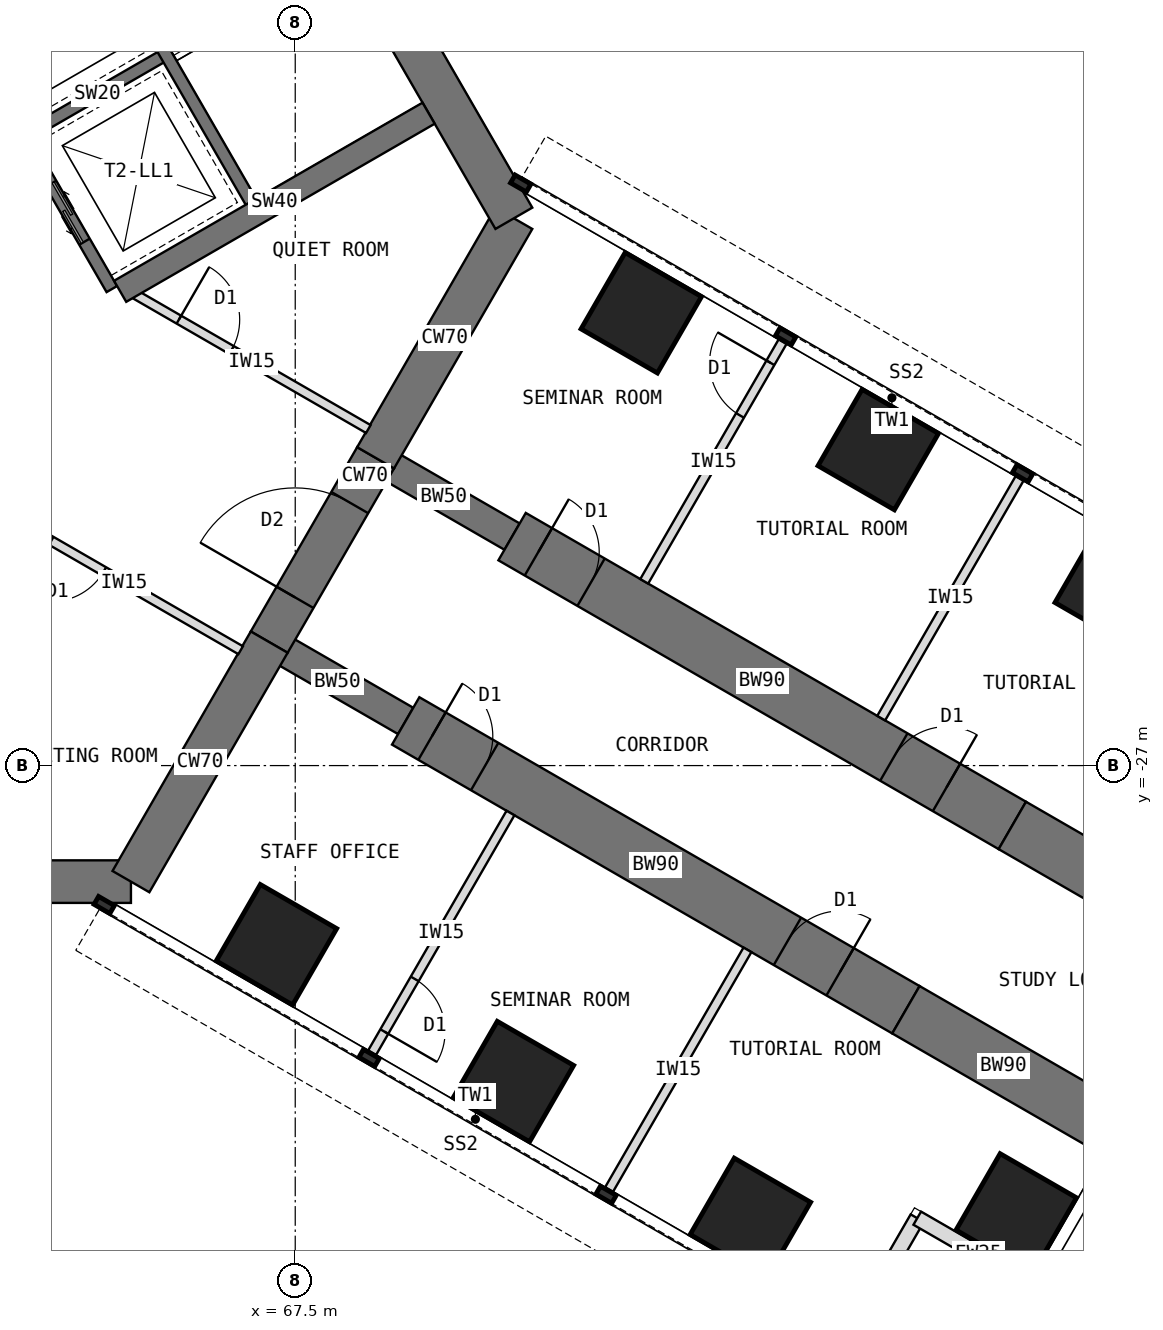
"""IFC4 building model, lengths in metres.
Left out: names, types, materials, properties, quantities, classifications, styles, units other than length and angle.
Written with IfcOpenShell. Run it as: python <this file> out.ifc"""

import sys

from ifc_helpers import new_model, si_unit, direction, frame, frame_2d, origin, origin_2d, place, context, subcontext, project, spatial, rectangle, extrude, element, fill, save


model = new_model("IFC4")
c1 = context("Model", 3, precision=1e-05, world=origin(), true_north=direction((0.0, 1.0)))
c2 = subcontext(c1, "Body", "Model", "MODEL_VIEW")
j1 = project(units=[si_unit("LENGTHUNIT", "METRE"), si_unit("PLANEANGLEUNIT", "RADIAN")], contexts=[c1])
p1 = place(None, origin())
s1 = spatial("IfcSite", under=j1, at=p1, CompositionType="ELEMENT")
p2 = place(p1, origin())
s2 = spatial("IfcBuilding", under=s1, at=p2, CompositionType="ELEMENT")
p3 = place(p2, frame((0.0, 0.0, 64.5)))
s3 = spatial("IfcBuildingStorey", under=s2, at=p3, CompositionType="ELEMENT", Elevation=64.5)
p4 = place(p3, frame((52.202, -28.908, 0.0), z_axis=(0.0, 0.0, 1.0), x_axis=(1.0, 0.0, 0.0)))
e1 = element("IfcWall", 1, at=p4, inside=s3, PredefinedType="SHEAR", context=c2, shape_type="SweptSolid", body=[
    extrude(rectangle(XDim=12.596, YDim=0.7, at=frame_2d((6.298, 0.0))), origin(), (0.0, 0.0, 1.0), 4.0),
])
p5 = place(p3, frame((64.798, -28.908, 0.0), z_axis=(0.0, 0.0, 1.0), x_axis=(0.499984222037, 0.866034513004, 0.0)))
e2 = element("IfcWall", 2, at=p5, inside=s3, PredefinedType="SHEAR", context=c2, shape_type="SweptSolid", body=[
    extrude(rectangle(XDim=4.548, YDim=0.7, at=frame_2d((2.274, 0.0))), origin(), (0.0, 0.0, 1.0), 4.0),
])
p6 = place(p3, frame((67.072, -24.97, 0.0), z_axis=(0.0, 0.0, 1.0), x_axis=(0.500010275428, 0.866019471182, 0.0)))
e3 = element("IfcWall", 3, at=p6, inside=s3, PredefinedType="SHEAR", context=c2, shape_type="SweptSolid", body=[
    extrude(rectangle(XDim=3.5, YDim=0.7, at=frame_2d((1.75, 0.0))), origin(), (0.0, 0.0, 1.0), 4.0),
])
p7 = place(p6, frame((0.85, 0.0, 0.0)))
e4 = element("IfcOpeningElement", 4, at=p7, cuts=e3, PredefinedType="OPENING", context=c2, shape_type="SweptSolid", body=[
    extrude(rectangle(XDim=1.8, YDim=2.1, at=frame_2d((0.9, 1.05))), frame((0.0, 0.36, 0.0), z_axis=(0.0, -1.0, 0.0), x_axis=(1.0, 0.0, 0.0)), (0.0, 0.0, 1.0), 0.72),
])
p8 = place(p3, frame((68.822, -21.939, 0.0), z_axis=(0.0, 0.0, 1.0), x_axis=(0.500024481964, 0.866011268655, 0.0)))
e5 = element("IfcWall", 5, at=p8, inside=s3, PredefinedType="SHEAR", context=c2, shape_type="SweptSolid", body=[
    extrude(rectangle(XDim=4.548, YDim=0.7, at=frame_2d((2.274, 0.0))), origin(), (0.0, 0.0, 1.0), 4.0),
])
p9 = place(p3, frame((71.096, -18.0, 0.0), z_axis=(0.0, 0.0, 1.0), x_axis=(-0.500005998175, 0.866021940709, 0.0)))
e6 = element("IfcWall", 6, at=p9, inside=s3, PredefinedType="SHEAR", context=c2, shape_type="SweptSolid", body=[
    extrude(rectangle(XDim=12.596, YDim=0.7, at=frame_2d((6.298, 0.0))), origin(), (0.0, 0.0, 1.0), 4.0),
])
p10 = place(p3, frame((68.822, -21.939, 0.0), z_axis=(0.0, 0.0, 1.0), x_axis=(0.866072649678, -0.499918158782, 0.0)))
e7 = element("IfcWall", 7, at=p10, inside=s3, PredefinedType="SHEAR", context=c2, shape_type="SweptSolid", body=[
    extrude(rectangle(XDim=2.592, YDim=0.5, at=frame_2d((1.296, 0.0))), origin(), (0.0, 0.0, 1.0), 4.0),
])
p11 = place(p3, frame((71.066, -23.234, 0.0), z_axis=(0.0, 0.0, 1.0), x_axis=(0.86602681393, -0.499997557548, 0.0)))
e8 = element("IfcWall", 8, at=p11, inside=s3, PredefinedType="SHEAR", context=c2, shape_type="SweptSolid", body=[
    extrude(rectangle(XDim=9.5, YDim=0.9, at=frame_2d((4.75, 0.0))), origin(), (0.0, 0.0, 1.0), 4.0),
])
p12 = place(p11, frame((0.5, 0.0, 0.0)))
e9 = element("IfcOpeningElement", 9, at=p12, cuts=e8, PredefinedType="OPENING", context=c2, shape_type="SweptSolid", body=[
    extrude(rectangle(XDim=1.0, YDim=2.1, at=frame_2d((0.5, 1.05))), frame((0.0, 0.46, 0.0), z_axis=(0.0, -1.0, 0.0), x_axis=(1.0, 0.0, 0.0)), (0.0, 0.0, 1.0), 0.92),
])
p13 = place(p11, frame((7.25, 0.0, 0.0)))
e10 = element("IfcOpeningElement", 10, at=p13, cuts=e8, PredefinedType="OPENING", context=c2, shape_type="SweptSolid", body=[
    extrude(rectangle(XDim=1.0, YDim=2.1, at=frame_2d((0.5, 1.05))), frame((0.0, 0.46, 0.0), z_axis=(0.0, -1.0, 0.0), x_axis=(1.0, 0.0, 0.0)), (0.0, 0.0, 1.0), 0.92),
])
p14 = place(p3, frame((79.294, -27.984, 0.0), z_axis=(0.0, 0.0, 1.0), x_axis=(0.866000971088, -0.500042316284, 0.0)))
e11 = element("IfcWall", 11, at=p14, inside=s3, PredefinedType="SHEAR", context=c2, shape_type="SweptSolid", body=[
    extrude(rectangle(XDim=3.7, YDim=0.9, at=frame_2d((1.85, 0.0))), origin(), (0.0, 0.0, 1.0), 4.0),
])
p15 = place(p3, frame((67.072, -24.97, 0.0), z_axis=(0.0, 0.0, 1.0), x_axis=(0.866031863473, -0.499988811324, 0.0)))
e12 = element("IfcWall", 12, at=p15, inside=s3, PredefinedType="SHEAR", context=c2, shape_type="SweptSolid", body=[
    extrude(rectangle(XDim=2.592, YDim=0.5, at=frame_2d((1.296, 0.0))), origin(), (0.0, 0.0, 1.0), 4.0),
])
p16 = place(p3, frame((69.316, -26.266, 0.0), z_axis=(0.0, 0.0, 1.0), x_axis=(0.86602681393, -0.499997557548, 0.0)))
e13 = element("IfcWall", 13, at=p16, inside=s3, PredefinedType="SHEAR", context=c2, shape_type="SweptSolid", body=[
    extrude(rectangle(XDim=9.5, YDim=0.9, at=frame_2d((4.75, 0.0))), origin(), (0.0, 0.0, 1.0), 4.0),
])
p17 = place(p16, frame((0.5, 0.0, 0.0)))
e14 = element("IfcOpeningElement", 14, at=p17, cuts=e13, PredefinedType="OPENING", context=c2, shape_type="SweptSolid", body=[
    extrude(rectangle(XDim=1.0, YDim=2.1, at=frame_2d((0.5, 1.05))), frame((0.0, 0.46, 0.0), z_axis=(0.0, -1.0, 0.0), x_axis=(1.0, 0.0, 0.0)), (0.0, 0.0, 1.0), 0.92),
])
p18 = place(p16, frame((7.25, 0.0, 0.0)))
e15 = element("IfcOpeningElement", 15, at=p18, cuts=e13, PredefinedType="OPENING", context=c2, shape_type="SweptSolid", body=[
    extrude(rectangle(XDim=1.0, YDim=2.1, at=frame_2d((0.5, 1.05))), frame((0.0, 0.46, 0.0), z_axis=(0.0, -1.0, 0.0), x_axis=(1.0, 0.0, 0.0)), (0.0, 0.0, 1.0), 0.92),
])
p19 = place(p3, frame((77.544, -31.016, 0.0), z_axis=(0.0, 0.0, 1.0), x_axis=(0.866029545028, -0.499992827086, 0.0)))
e16 = element("IfcWall", 16, at=p19, inside=s3, PredefinedType="SHEAR", context=c2, shape_type="SweptSolid", body=[
    extrude(rectangle(XDim=3.7, YDim=0.9, at=frame_2d((1.85, 0.0))), origin(), (0.0, 0.0, 1.0), 4.0),
])
for number, where, z_axis, x_axis in (
    (17, (73.191, -19.554, 0.0), (0.0, 0.0, 1.0), (0.5, 0.866, 0.0)),
    (18, (67.191, -29.946, 0.0), (0.0, 0.0, 1.0), (0.5, 0.866, 0.0)),
    (19, (77.088, -21.804, 0.0), (0.0, 0.0, 1.0), (0.5, 0.866, 0.0)),
    (20, (71.088, -32.196, 0.0), (0.0, 0.0, 1.0), (0.5, 0.866, 0.0)),
    (21, (80.986, -24.054, 0.0), (0.0, 0.0, 1.0), (0.5, 0.866, 0.0)),
    (22, (74.986, -34.446, 0.0), (0.0, 0.0, 1.0), (0.5, 0.866, 0.0)),
    (23, (79.358, -34.373, 0.0), (0.0, 0.0, 1.0), (0.5, 0.866, 0.0)),
):
    element("IfcColumn", number, at=place(p3, frame(where, z_axis=z_axis, x_axis=x_axis)), inside=s3, PredefinedType="COLUMN", context=c2, shape_type="SweptSolid", body=[
        extrude(rectangle(XDim=1.45, YDim=1.45, at=origin_2d()), origin(), (0.0, 0.0, 1.0), 4.0),
    ])
for number, where, z_axis, x_axis in (
    (24, (76.567, -36.456, 0.0), (0.0, 0.0, 1.0), (0.5, 0.866, 0.0)),
    (25, (77.73, -34.443, 0.0), (0.0, 0.0, 1.0), (0.866, -0.5, 0.0)),
):
    element("IfcWall", number, at=place(p3, frame(where, z_axis=z_axis, x_axis=x_axis)), inside=s3, PredefinedType="STANDARD", context=c2, shape_type="SweptSolid", body=[
        extrude(rectangle(XDim=2.325, YDim=0.25, at=frame_2d((1.163, 0.0))), origin(), (0.0, 0.0, 1.0), 3.8),
    ])
p20 = place(p3, frame((64.484, -19.164, 0.0), z_axis=(0.0, 0.0, 1.0), x_axis=(-0.49999894854, 0.866026010844, 0.0)))
e26 = element("IfcWall", 26, at=p20, inside=s3, PredefinedType="SHEAR", context=c2, shape_type="SweptSolid", body=[
    extrude(rectangle(XDim=8.0, YDim=0.2, at=frame_2d((4.0, 0.0))), origin(), (0.0, 0.0, 1.0), 4.0),
])
p21 = place(p20, frame((6.3, 0.0, 0.0)))
e27 = element("IfcOpeningElement", 27, at=p21, cuts=e26, PredefinedType="OPENING", context=c2, shape_type="SweptSolid", body=[
    extrude(rectangle(XDim=1.2, YDim=2.1, at=frame_2d((0.6, 1.05))), frame((0.0, 0.11, 0.0), z_axis=(0.0, -1.0, 0.0), x_axis=(1.0, 0.0, 0.0)), (0.0, 0.0, 1.0), 0.22),
])
p22 = place(p20, frame((0.9, 0.0, 0.0)))
e28 = element("IfcOpeningElement", 28, at=p22, cuts=e26, PredefinedType="OPENING", context=c2, shape_type="SweptSolid", body=[
    extrude(rectangle(XDim=1.1, YDim=2.2, at=frame_2d((0.55, 1.1))), frame((0.0, 0.11, 0.0), z_axis=(0.0, -1.0, 0.0), x_axis=(1.0, 0.0, 0.0)), (0.0, 0.0, 1.0), 0.22),
])
p23 = place(p20, frame((3.8, 0.0, 0.0)))
e29 = element("IfcOpeningElement", 29, at=p23, cuts=e26, PredefinedType="OPENING", context=c2, shape_type="SweptSolid", body=[
    extrude(rectangle(XDim=1.1, YDim=2.2, at=frame_2d((0.55, 1.1))), frame((0.0, 0.11, 0.0), z_axis=(0.0, -1.0, 0.0), x_axis=(1.0, 0.0, 0.0)), (0.0, 0.0, 1.0), 0.22),
])
p24 = place(p3, frame((63.12, -16.603, 0.0), z_axis=(0.0, 0.0, 1.0), x_axis=(0.866062058628, 0.499936506574, 0.0)))
e30 = element("IfcWall", 30, at=p24, inside=s3, PredefinedType="SHEAR", context=c2, shape_type="SweptSolid", body=[
    extrude(rectangle(XDim=2.6, YDim=0.2, at=frame_2d((1.3, 0.0))), origin(), (0.0, 0.0, 1.0), 4.0),
])
p25 = place(p3, frame((66.822, -17.814, 0.0), z_axis=(0.0, 0.0, 1.0), x_axis=(-0.49999894854, 0.866026010844, 0.0)))
e31 = element("IfcWall", 31, at=p25, inside=s3, PredefinedType="SHEAR", context=c2, shape_type="SweptSolid", body=[
    extrude(rectangle(XDim=8.0, YDim=0.2, at=frame_2d((4.0, 0.0))), origin(), (0.0, 0.0, 1.0), 4.0),
])
p26 = place(p25, frame((6.7, 0.0, 0.0)))
e32 = element("IfcOpeningElement", 32, at=p26, cuts=e31, PredefinedType="OPENING", context=c2, shape_type="SweptSolid", body=[
    extrude(rectangle(XDim=1.1, YDim=2.1, at=frame_2d((0.55, 1.05))), frame((0.0, 0.11, 0.0), z_axis=(0.0, -1.0, 0.0), x_axis=(1.0, 0.0, 0.0)), (0.0, 0.0, 1.0), 0.22),
])
p27 = place(p3, frame((64.62, -19.201, 0.0), z_axis=(0.0, 0.0, 1.0), x_axis=(0.866023886965, 0.500002627198, 0.0)))
e33 = element("IfcWall", 33, at=p27, inside=s3, PredefinedType="SHEAR", context=c2, shape_type="SweptSolid", body=[
    extrude(rectangle(XDim=5.858, YDim=0.4, at=frame_2d((2.929, 0.0))), origin(), (0.0, 0.0, 1.0), 4.0),
])
p28 = place(p3, frame((73.24, -23.97, 0.0), z_axis=(0.0, 0.0, 1.0), x_axis=(0.499982560684, 0.866035472144, 0.0)))
e34 = element("IfcWall", 34, at=p28, inside=s3, PredefinedType="PARTITIONING", context=c2, shape_type="SweptSolid", body=[
    extrude(rectangle(XDim=4.55, YDim=0.15, at=frame_2d((2.275, 0.0))), origin(), (0.0, 0.0, 1.0), 3.8),
])
p29 = place(p28, frame((3.15, 0.0, 0.0)))
e35 = element("IfcOpeningElement", 35, at=p29, cuts=e34, PredefinedType="OPENING", context=c2, shape_type="SweptSolid", body=[
    extrude(rectangle(XDim=1.0, YDim=2.1, at=frame_2d((0.5, 1.05))), frame((0.0, 0.085, 0.0), z_axis=(0.0, -1.0, 0.0), x_axis=(1.0, 0.0, 0.0)), (0.0, 0.0, 1.0), 0.17),
])
p30 = place(p3, frame((77.137, -26.22, 0.0), z_axis=(0.0, 0.0, 1.0), x_axis=(0.500022803284, 0.866012237902, 0.0)))
e36 = element("IfcWall", 36, at=p30, inside=s3, PredefinedType="PARTITIONING", context=c2, shape_type="SweptSolid", body=[
    extrude(rectangle(XDim=4.55, YDim=0.15, at=frame_2d((2.275, 0.0))), origin(), (0.0, 0.0, 1.0), 3.8),
])
p31 = place(p3, frame((71.04, -27.78, 0.0), z_axis=(0.0, 0.0, 1.0), x_axis=(-0.499982560684, -0.866035472144, 0.0)))
e37 = element("IfcWall", 37, at=p31, inside=s3, PredefinedType="PARTITIONING", context=c2, shape_type="SweptSolid", body=[
    extrude(rectangle(XDim=4.55, YDim=0.15, at=frame_2d((2.275, 0.0))), origin(), (0.0, 0.0, 1.0), 3.8),
])
p32 = place(p31, frame((3.15, 0.0, 0.0)))
e38 = element("IfcOpeningElement", 38, at=p32, cuts=e37, PredefinedType="OPENING", context=c2, shape_type="SweptSolid", body=[
    extrude(rectangle(XDim=1.0, YDim=2.1, at=frame_2d((0.5, 1.05))), frame((0.0, 0.085, 0.0), z_axis=(0.0, -1.0, 0.0), x_axis=(1.0, 0.0, 0.0)), (0.0, 0.0, 1.0), 0.17),
])
p33 = place(p3, frame((74.937, -30.03, 0.0), z_axis=(0.0, 0.0, 1.0), x_axis=(-0.499982560684, -0.866035472144, 0.0)))
e39 = element("IfcWall", 39, at=p33, inside=s3, PredefinedType="PARTITIONING", context=c2, shape_type="SweptSolid", body=[
    extrude(rectangle(XDim=4.55, YDim=0.15, at=frame_2d((2.275, 0.0))), origin(), (0.0, 0.0, 1.0), 3.8),
])
p34 = place(p3, frame((64.87, -19.253, 0.0), z_axis=(0.0, 0.0, 1.0), x_axis=(0.866021148949, -0.500007369519, 0.0)))
e40 = element("IfcWall", 40, at=p34, inside=s3, PredefinedType="PARTITIONING", context=c2, shape_type="SweptSolid", body=[
    extrude(rectangle(XDim=4.426, YDim=0.15, at=frame_2d((2.213, 0.0))), origin(), (0.0, 0.0, 1.0), 3.8),
])
p35 = place(p34, frame((0.828, 0.0, 0.0)))
e41 = element("IfcOpeningElement", 41, at=p35, cuts=e40, PredefinedType="OPENING", context=c2, shape_type="SweptSolid", body=[
    extrude(rectangle(XDim=1.0, YDim=2.1, at=frame_2d((0.5, 1.05))), frame((0.0, 0.085, 0.0), z_axis=(0.0, -1.0, 0.0), x_axis=(1.0, 0.0, 0.0)), (0.0, 0.0, 1.0), 0.17),
])
p36 = place(p3, frame((66.603, -25.103, 0.0), z_axis=(0.0, 0.0, 1.0), x_axis=(-0.866021148949, 0.500007369519, 0.0)))
e42 = element("IfcWall", 42, at=p36, inside=s3, PredefinedType="PARTITIONING", context=c2, shape_type="SweptSolid", body=[
    extrude(rectangle(XDim=4.426, YDim=0.15, at=frame_2d((2.213, 0.0))), origin(), (0.0, 0.0, 1.0), 3.8),
])
p37 = place(p36, frame((2.598, 0.0, 0.0)))
e43 = element("IfcOpeningElement", 43, at=p37, cuts=e42, PredefinedType="OPENING", context=c2, shape_type="SweptSolid", body=[
    extrude(rectangle(XDim=1.0, YDim=2.1, at=frame_2d((0.5, 1.05))), frame((0.0, 0.085, 0.0), z_axis=(0.0, -1.0, 0.0), x_axis=(1.0, 0.0, 0.0)), (0.0, 0.0, 1.0), 0.17),
])
p38 = place(p22, origin())
e44 = element("IfcDoor", 44, at=p38, inside=s3, OperationType="DOUBLE_DOOR_SLIDING", PredefinedType="DOOR", context=c2, shape_type="SweptSolid", body=[
    extrude(rectangle(XDim=1.1, YDim=2.2, at=frame_2d((0.55, 1.1))), frame((0.0, 0.025, 0.0), z_axis=(0.0, -1.0, 0.0), x_axis=(1.0, 0.0, 0.0)), (0.0, 0.0, 1.0), 0.05),
])
fill(e28, e44)
p39 = place(p7, origin())
e45 = element("IfcDoor", 45, at=p39, inside=s3, OperationType="DOUBLE_DOOR_DOUBLE_SWING", PredefinedType="DOOR", context=c2, shape_type="SweptSolid", body=[
    extrude(rectangle(XDim=1.72, YDim=2.06, at=frame_2d((0.9, 1.03))), frame((0.0, 0.025, 0.0), z_axis=(0.0, -1.0, 0.0), x_axis=(1.0, 0.0, 0.0)), (0.0, 0.0, 1.0), 0.05),
    extrude(rectangle(XDim=0.04, YDim=2.1, at=frame_2d((0.02, 1.05))), frame((0.0, 0.35, 0.0), z_axis=(0.0, -1.0, 0.0), x_axis=(1.0, 0.0, 0.0)), (0.0, 0.0, 1.0), 0.699),
    extrude(rectangle(XDim=0.04, YDim=2.1, at=frame_2d((1.78, 1.05))), frame((0.0, 0.35, 0.0), z_axis=(0.0, -1.0, 0.0), x_axis=(1.0, 0.0, 0.0)), (0.0, 0.0, 1.0), 0.699),
    extrude(rectangle(XDim=1.72, YDim=0.04, at=frame_2d((0.9, 2.08))), frame((0.0, 0.35, 0.0), z_axis=(0.0, -1.0, 0.0), x_axis=(1.0, 0.0, 0.0)), (0.0, 0.0, 1.0), 0.699),
])
fill(e4, e45)
p40 = place(p29, origin())
e46 = element("IfcDoor", 46, at=p40, inside=s3, OperationType="SINGLE_SWING_RIGHT", PredefinedType="DOOR", context=c2, shape_type="SweptSolid", body=[
    extrude(rectangle(XDim=1.0, YDim=2.1, at=frame_2d((0.5, 1.05))), frame((0.0, 0.025, 0.0), z_axis=(0.0, -1.0, 0.0), x_axis=(1.0, 0.0, 0.0)), (0.0, 0.0, 1.0), 0.05),
])
fill(e35, e46)
p41 = place(p32, origin())
e47 = element("IfcDoor", 47, at=p41, inside=s3, OperationType="SINGLE_SWING_RIGHT", PredefinedType="DOOR", context=c2, shape_type="SweptSolid", body=[
    extrude(rectangle(XDim=1.0, YDim=2.1, at=frame_2d((0.5, 1.05))), frame((0.0, 0.025, 0.0), z_axis=(0.0, -1.0, 0.0), x_axis=(1.0, 0.0, 0.0)), (0.0, 0.0, 1.0), 0.05),
])
fill(e38, e47)
p42 = place(p37, origin())
e48 = element("IfcDoor", 48, at=p42, inside=s3, OperationType="SINGLE_SWING_RIGHT", PredefinedType="DOOR", context=c2, shape_type="SweptSolid", body=[
    extrude(rectangle(XDim=1.0, YDim=2.1, at=frame_2d((0.5, 1.05))), frame((0.0, 0.025, 0.0), z_axis=(0.0, -1.0, 0.0), x_axis=(1.0, 0.0, 0.0)), (0.0, 0.0, 1.0), 0.05),
])
fill(e43, e48)
p43 = place(p35, origin())
e49 = element("IfcDoor", 49, at=p43, inside=s3, OperationType="SINGLE_SWING_LEFT", PredefinedType="DOOR", context=c2, shape_type="SweptSolid", body=[
    extrude(rectangle(XDim=1.0, YDim=2.1, at=frame_2d((0.5, 1.05))), frame((0.0, 0.025, 0.0), z_axis=(0.0, -1.0, 0.0), x_axis=(1.0, 0.0, 0.0)), (0.0, 0.0, 1.0), 0.05),
])
fill(e41, e49)
p44 = place(p12, origin())
e50 = element("IfcDoor", 50, at=p44, inside=s3, OperationType="SINGLE_SWING_LEFT", PredefinedType="DOOR", context=c2, shape_type="SweptSolid", body=[
    extrude(rectangle(XDim=0.92, YDim=2.06, at=frame_2d((0.5, 1.03))), frame((0.0, 0.025, 0.0), z_axis=(0.0, -1.0, 0.0), x_axis=(1.0, 0.0, 0.0)), (0.0, 0.0, 1.0), 0.05),
    extrude(rectangle(XDim=0.04, YDim=2.1, at=frame_2d((0.02, 1.05))), frame((0.0, 0.45, 0.0), z_axis=(0.0, -1.0, 0.0), x_axis=(1.0, 0.0, 0.0)), (0.0, 0.0, 1.0), 0.899),
    extrude(rectangle(XDim=0.04, YDim=2.1, at=frame_2d((0.98, 1.05))), frame((0.0, 0.45, 0.0), z_axis=(0.0, -1.0, 0.0), x_axis=(1.0, 0.0, 0.0)), (0.0, 0.0, 1.0), 0.899),
    extrude(rectangle(XDim=0.92, YDim=0.04, at=frame_2d((0.5, 2.08))), frame((0.0, 0.45, 0.0), z_axis=(0.0, -1.0, 0.0), x_axis=(1.0, 0.0, 0.0)), (0.0, 0.0, 1.0), 0.899),
])
fill(e9, e50)
p45 = place(p13, origin())
e51 = element("IfcDoor", 51, at=p45, inside=s3, OperationType="SINGLE_SWING_RIGHT", PredefinedType="DOOR", context=c2, shape_type="SweptSolid", body=[
    extrude(rectangle(XDim=0.92, YDim=2.06, at=frame_2d((0.5, 1.03))), frame((0.0, 0.025, 0.0), z_axis=(0.0, -1.0, 0.0), x_axis=(1.0, 0.0, 0.0)), (0.0, 0.0, 1.0), 0.05),
    extrude(rectangle(XDim=0.04, YDim=2.1, at=frame_2d((0.02, 1.05))), frame((0.0, 0.45, 0.0), z_axis=(0.0, -1.0, 0.0), x_axis=(1.0, 0.0, 0.0)), (0.0, 0.0, 1.0), 0.899),
    extrude(rectangle(XDim=0.04, YDim=2.1, at=frame_2d((0.98, 1.05))), frame((0.0, 0.45, 0.0), z_axis=(0.0, -1.0, 0.0), x_axis=(1.0, 0.0, 0.0)), (0.0, 0.0, 1.0), 0.899),
    extrude(rectangle(XDim=0.92, YDim=0.04, at=frame_2d((0.5, 2.08))), frame((0.0, 0.45, 0.0), z_axis=(0.0, -1.0, 0.0), x_axis=(1.0, 0.0, 0.0)), (0.0, 0.0, 1.0), 0.899),
])
fill(e10, e51)
p46 = place(p17, origin())
e52 = element("IfcDoor", 52, at=p46, inside=s3, OperationType="SINGLE_SWING_LEFT", PredefinedType="DOOR", context=c2, shape_type="SweptSolid", body=[
    extrude(rectangle(XDim=0.92, YDim=2.06, at=frame_2d((0.5, 1.03))), frame((0.0, 0.025, 0.0), z_axis=(0.0, -1.0, 0.0), x_axis=(1.0, 0.0, 0.0)), (0.0, 0.0, 1.0), 0.05),
    extrude(rectangle(XDim=0.04, YDim=2.1, at=frame_2d((0.02, 1.05))), frame((0.0, 0.45, 0.0), z_axis=(0.0, -1.0, 0.0), x_axis=(1.0, 0.0, 0.0)), (0.0, 0.0, 1.0), 0.899),
    extrude(rectangle(XDim=0.04, YDim=2.1, at=frame_2d((0.98, 1.05))), frame((0.0, 0.45, 0.0), z_axis=(0.0, -1.0, 0.0), x_axis=(1.0, 0.0, 0.0)), (0.0, 0.0, 1.0), 0.899),
    extrude(rectangle(XDim=0.92, YDim=0.04, at=frame_2d((0.5, 2.08))), frame((0.0, 0.45, 0.0), z_axis=(0.0, -1.0, 0.0), x_axis=(1.0, 0.0, 0.0)), (0.0, 0.0, 1.0), 0.899),
])
fill(e14, e52)
p47 = place(p18, origin())
e53 = element("IfcDoor", 53, at=p47, inside=s3, OperationType="SINGLE_SWING_RIGHT", PredefinedType="DOOR", context=c2, shape_type="SweptSolid", body=[
    extrude(rectangle(XDim=0.92, YDim=2.06, at=frame_2d((0.5, 1.03))), frame((0.0, 0.025, 0.0), z_axis=(0.0, -1.0, 0.0), x_axis=(1.0, 0.0, 0.0)), (0.0, 0.0, 1.0), 0.05),
    extrude(rectangle(XDim=0.04, YDim=2.1, at=frame_2d((0.02, 1.05))), frame((0.0, 0.45, 0.0), z_axis=(0.0, -1.0, 0.0), x_axis=(1.0, 0.0, 0.0)), (0.0, 0.0, 1.0), 0.899),
    extrude(rectangle(XDim=0.04, YDim=2.1, at=frame_2d((0.98, 1.05))), frame((0.0, 0.45, 0.0), z_axis=(0.0, -1.0, 0.0), x_axis=(1.0, 0.0, 0.0)), (0.0, 0.0, 1.0), 0.899),
    extrude(rectangle(XDim=0.92, YDim=0.04, at=frame_2d((0.5, 2.08))), frame((0.0, 0.45, 0.0), z_axis=(0.0, -1.0, 0.0), x_axis=(1.0, 0.0, 0.0)), (0.0, 0.0, 1.0), 0.899),
])
fill(e15, e53)
save(model, sys.argv[1])
